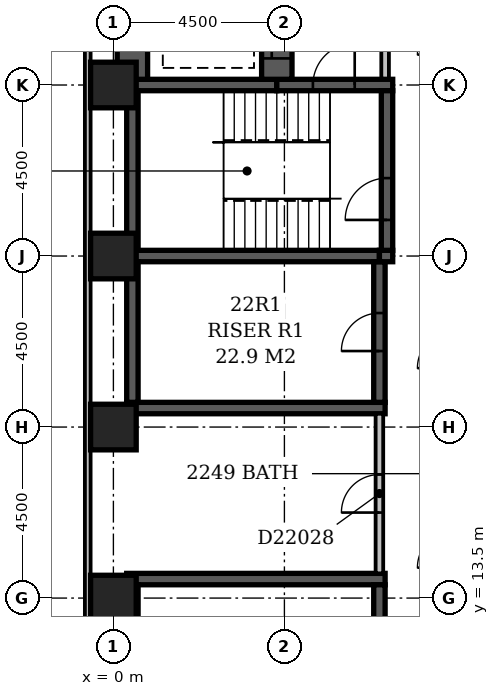
"""IFC4 building model, lengths in metres.
Left out: names, types, materials, properties, quantities, classifications, styles, units other than length and angle.
Written with IfcOpenShell. Run it as: python <this file> out.ifc"""

import sys

from ifc_helpers import new_model, si_unit, direction, frame, frame_2d, origin, origin_2d, place, context, subcontext, project, spatial, rectangle, extrude, element, fill, save


model = new_model("IFC4")
c1 = context("Model", 3, precision=1e-05, world=origin(), true_north=direction((0.0, 1.0)))
c2 = subcontext(c1, "Body", "Model", "MODEL_VIEW")
j1 = project(units=[si_unit("LENGTHUNIT", "METRE"), si_unit("PLANEANGLEUNIT", "RADIAN")], contexts=[c1])
p1 = place(None, origin())
s1 = spatial("IfcSite", under=j1, at=p1, CompositionType="ELEMENT")
p2 = place(p1, origin())
s2 = spatial("IfcBuilding", under=s1, at=p2, CompositionType="ELEMENT")
p3 = place(p2, frame((0.0, 0.0, 90.2)))
s3 = spatial("IfcBuildingStorey", under=s2, at=p3, CompositionType="ELEMENT", Elevation=90.2)
for number, where, z_axis, x_axis in (
    (1, (0.35, 14.0, -0.3), (0.0, 0.0, 1.0), (1.0, 0.0, 0.0)),
    (2, (0.35, 18.5, -0.3), (0.0, 0.0, 1.0), (1.0, 0.0, 0.0)),
):
    element("IfcWall", number, at=place(p3, frame(where, z_axis=z_axis, x_axis=x_axis)), inside=s3, PredefinedType="SHEAR", context=c2, shape_type="SweptSolid", body=[
        extrude(rectangle(XDim=6.8, YDim=0.3, at=frame_2d((3.4, 0.0))), origin(), (0.0, 0.0, 1.0), 3.6),
    ])
p4 = place(p3, frame((0.35, 22.5, -0.3), z_axis=(0.0, 0.0, 1.0), x_axis=(1.0, 0.0, 0.0)))
e3 = element("IfcWall", 3, at=p4, inside=s3, PredefinedType="SHEAR", context=c2, shape_type="SweptSolid", body=[
    extrude(rectangle(XDim=6.65, YDim=0.3, at=frame_2d((3.325, 0.0))), origin(), (0.0, 0.0, 1.0), 3.6),
])
p5 = place(p3, frame((0.35, 27.0, -0.3), z_axis=(0.0, 0.0, 1.0), x_axis=(1.0, 0.0, 0.0)))
e4 = element("IfcWall", 4, at=p5, inside=s3, PredefinedType="SHEAR", context=c2, shape_type="SweptSolid", body=[
    extrude(rectangle(XDim=3.95, YDim=0.3, at=frame_2d((1.975, 0.0))), origin(), (0.0, 0.0, 1.0), 3.6),
])
for number, where, z_axis, x_axis in (
    (5, (0.5, 10.15, -0.3), (0.0, 0.0, 1.0), (0.0, 1.0, 0.0)),
    (6, (0.5, 18.65, -0.3), (0.0, 0.0, 1.0), (0.0, 1.0, 0.0)),
):
    element("IfcWall", number, at=place(p3, frame(where, z_axis=z_axis, x_axis=x_axis)), inside=s3, PredefinedType="SHEAR", context=c2, shape_type="SweptSolid", body=[
        extrude(rectangle(XDim=3.7, YDim=0.3, at=frame_2d((1.85, 0.0))), origin(), (0.0, 0.0, 1.0), 3.6),
    ])
p6 = place(p3, frame((0.5, 22.65, -0.3), z_axis=(0.0, 0.0, 1.0), x_axis=(0.0, 1.0, 0.0)))
e7 = element("IfcWall", 7, at=p6, inside=s3, PredefinedType="SHEAR", context=c2, shape_type="SweptSolid", body=[
    extrude(rectangle(XDim=4.2, YDim=0.3, at=frame_2d((2.1, 0.0))), origin(), (0.0, 0.0, 1.0), 3.6),
])
p7 = place(p3, frame((0.5, 27.15, -0.3), z_axis=(0.0, 0.0, 1.0), x_axis=(0.0, 1.0, 0.0)))
e8 = element("IfcWall", 8, at=p7, inside=s3, PredefinedType="SHEAR", context=c2, shape_type="SweptSolid", body=[
    extrude(rectangle(XDim=6.95, YDim=0.8, at=frame_2d((3.475, 0.0))), origin(), (0.0, 0.0, 1.0), 3.6),
])
p8 = place(p3, frame((4.3, 27.0, -0.3), z_axis=(0.0, 0.0, 1.0), x_axis=(1.0, 0.0, 0.0)))
e9 = element("IfcWall", 9, at=p8, inside=s3, PredefinedType="SHEAR", context=c2, shape_type="SweptSolid", body=[
    extrude(rectangle(XDim=3.05, YDim=0.3, at=frame_2d((1.525, 0.0))), origin(), (0.0, 0.0, 1.0), 3.6),
])
p9 = place(p8, frame((0.95, 0.0, 0.3)))
e10 = element("IfcOpeningElement", 10, at=p9, cuts=e9, PredefinedType="OPENING", context=c2, shape_type="SweptSolid", body=[
    extrude(rectangle(XDim=1.1, YDim=2.1, at=frame_2d((0.55, 1.05))), frame((0.0, 0.162, 0.0), z_axis=(0.0, -1.0, 0.0), x_axis=(1.0, 0.0, 0.0)), (0.0, 0.0, 1.0), 0.324),
])
p10 = place(p3, frame((4.3, 27.15, -0.3), z_axis=(0.0, 0.0, 1.0), x_axis=(0.0, 1.0, 0.0)))
e11 = element("IfcWall", 11, at=p10, inside=s3, PredefinedType="SHEAR", context=c2, shape_type="SweptSolid", body=[
    extrude(rectangle(XDim=6.95, YDim=0.8, at=frame_2d((3.475, 0.0))), origin(), (0.0, 0.0, 1.0), 3.6),
])
p11 = place(p10, frame((3.05, 0.0, 0.3)))
e12 = element("IfcOpeningElement", 12, at=p11, cuts=e11, PredefinedType="OPENING", context=c2, shape_type="SweptSolid", body=[
    extrude(rectangle(XDim=1.1, YDim=2.1, at=frame_2d((0.55, 1.05))), frame((0.0, 0.412, 0.0), z_axis=(0.0, -1.0, 0.0), x_axis=(1.0, 0.0, 0.0)), (0.0, 0.0, 1.0), 0.824),
])
p12 = place(p10, frame((0.55, 0.0, 0.3)))
e13 = element("IfcOpeningElement", 13, at=p12, cuts=e11, PredefinedType="OPENING", context=c2, shape_type="SweptSolid", body=[
    extrude(rectangle(XDim=1.1, YDim=2.1, at=frame_2d((0.55, 1.05))), frame((0.0, 0.412, 0.0), z_axis=(0.0, -1.0, 0.0), x_axis=(1.0, 0.0, 0.0)), (0.0, 0.0, 1.0), 0.824),
])
p13 = place(p10, frame((5.35, 0.0, 0.3)))
e14 = element("IfcOpeningElement", 14, at=p13, cuts=e11, PredefinedType="OPENING", context=c2, shape_type="SweptSolid", body=[
    extrude(rectangle(XDim=1.1, YDim=2.1, at=frame_2d((0.55, 1.05))), frame((0.0, 0.412, 0.0), z_axis=(0.0, -1.0, 0.0), x_axis=(1.0, 0.0, 0.0)), (0.0, 0.0, 1.0), 0.824),
])
p14 = place(p3, frame((7.0, 10.15, -0.3), z_axis=(0.0, 0.0, 1.0), x_axis=(0.0, 1.0, 0.0)))
e15 = element("IfcWall", 15, at=p14, inside=s3, PredefinedType="SHEAR", context=c2, shape_type="SweptSolid", body=[
    extrude(rectangle(XDim=3.7, YDim=0.3, at=frame_2d((1.85, 0.0))), origin(), (0.0, 0.0, 1.0), 3.6),
])
p15 = place(p14, frame((1.35, 0.0, 0.3)))
e16 = element("IfcOpeningElement", 16, at=p15, cuts=e15, PredefinedType="OPENING", context=c2, shape_type="SweptSolid", body=[
    extrude(rectangle(XDim=1.0, YDim=2.1, at=frame_2d((0.5, 1.05))), frame((0.0, 0.162, 0.0), z_axis=(0.0, -1.0, 0.0), x_axis=(1.0, 0.0, 0.0)), (0.0, 0.0, 1.0), 0.324),
])
p16 = place(p3, frame((7.0, 18.65, -0.3), z_axis=(0.0, 0.0, 1.0), x_axis=(0.0, 1.0, 0.0)))
e17 = element("IfcWall", 17, at=p16, inside=s3, PredefinedType="SHEAR", context=c2, shape_type="SweptSolid", body=[
    extrude(rectangle(XDim=3.7, YDim=0.3, at=frame_2d((1.85, 0.0))), origin(), (0.0, 0.0, 1.0), 3.6),
])
p17 = place(p16, frame((1.35, 0.0, 0.3)))
e18 = element("IfcOpeningElement", 18, at=p17, cuts=e17, PredefinedType="OPENING", context=c2, shape_type="SweptSolid", body=[
    extrude(rectangle(XDim=1.0, YDim=2.1, at=frame_2d((0.5, 1.05))), frame((0.0, 0.162, 0.0), z_axis=(0.0, -1.0, 0.0), x_axis=(1.0, 0.0, 0.0)), (0.0, 0.0, 1.0), 0.324),
])
p18 = place(p3, frame((7.0, 22.5, -0.3), z_axis=(0.0, 0.0, 1.0), x_axis=(1.0, 0.0, 0.0)))
e19 = element("IfcWall", 19, at=p18, inside=s3, PredefinedType="SHEAR", context=c2, shape_type="SweptSolid", body=[
    extrude(rectangle(XDim=0.35, YDim=0.3, at=frame_2d((0.175, 0.0))), origin(), (0.0, 0.0, 1.0), 3.6),
])
p19 = place(p3, frame((7.2, 22.65, -0.3), z_axis=(0.0, 0.0, 1.0), x_axis=(0.0, 1.0, 0.0)))
e20 = element("IfcWall", 20, at=p19, inside=s3, PredefinedType="SHEAR", context=c2, shape_type="SweptSolid", body=[
    extrude(rectangle(XDim=4.2, YDim=0.3, at=frame_2d((2.1, 0.0))), origin(), (0.0, 0.0, 1.0), 3.6),
])
p20 = place(p19, frame((0.8, 0.0, 0.3)))
e21 = element("IfcOpeningElement", 21, at=p20, cuts=e20, PredefinedType="OPENING", context=c2, shape_type="SweptSolid", body=[
    extrude(rectangle(XDim=1.1, YDim=2.1, at=frame_2d((0.55, 1.05))), frame((0.0, 0.162, 0.0), z_axis=(0.0, -1.0, 0.0), x_axis=(1.0, 0.0, 0.0)), (0.0, 0.0, 1.0), 0.324),
])
for number, where, z_axis, x_axis in (
    (22, (0.0, 13.5, -0.3), (0.0, 0.0, 1.0), (1.0, 0.0, 0.0)),
    (23, (0.0, 18.0, -0.3), (0.0, 0.0, 1.0), (1.0, 0.0, 0.0)),
    (24, (0.0, 22.5, -0.3), (0.0, 0.0, 1.0), (1.0, 0.0, 0.0)),
    (25, (0.0, 27.0, -0.3), (0.0, 0.0, 1.0), (1.0, 0.0, 0.0)),
):
    element("IfcColumn", number, at=place(p3, frame(where, z_axis=z_axis, x_axis=x_axis)), inside=s3, PredefinedType="COLUMN", context=c2, shape_type="SweptSolid", body=[
        extrude(rectangle(XDim=1.2, YDim=1.2, at=origin_2d()), origin(), (0.0, 0.0, 1.0), 3.6),
    ])
p21 = place(p3, frame((-0.675, 59.1, 0.0), z_axis=(0.0, 0.0, 1.0), x_axis=(0.0, -1.0, 0.0)))
e26 = element("IfcWall", 26, at=p21, inside=s3, PredefinedType="STANDARD", context=c2, shape_type="SweptSolid", body=[
    extrude(rectangle(XDim=55.35, YDim=0.15, at=frame_2d((27.675, 0.0))), origin(), (0.0, 0.0, 1.0), 2.7),
])
p22 = place(p21, frame((10.65, 0.0, 0.6)))
e27 = element("IfcOpeningElement", 27, at=p22, cuts=e26, PredefinedType="OPENING", context=c2, shape_type="SweptSolid", body=[
    extrude(rectangle(XDim=2.4, YDim=1.8, at=frame_2d((1.2, 0.9))), frame((0.0, 0.087, 0.0), z_axis=(0.0, -1.0, 0.0), x_axis=(1.0, 0.0, 0.0)), (0.0, 0.0, 1.0), 0.174),
])
p23 = place(p21, frame((15.15, 0.0, 0.6)))
e28 = element("IfcOpeningElement", 28, at=p23, cuts=e26, PredefinedType="OPENING", context=c2, shape_type="SweptSolid", body=[
    extrude(rectangle(XDim=2.4, YDim=1.8, at=frame_2d((1.2, 0.9))), frame((0.0, 0.087, 0.0), z_axis=(0.0, -1.0, 0.0), x_axis=(1.0, 0.0, 0.0)), (0.0, 0.0, 1.0), 0.174),
])
p24 = place(p21, frame((19.65, 0.0, 0.6)))
e29 = element("IfcOpeningElement", 29, at=p24, cuts=e26, PredefinedType="OPENING", context=c2, shape_type="SweptSolid", body=[
    extrude(rectangle(XDim=2.4, YDim=1.8, at=frame_2d((1.2, 0.9))), frame((0.0, 0.087, 0.0), z_axis=(0.0, -1.0, 0.0), x_axis=(1.0, 0.0, 0.0)), (0.0, 0.0, 1.0), 0.174),
])
p25 = place(p3, frame((7.15, 27.17, 0.0), z_axis=(0.0, 0.0, 1.0), x_axis=(0.0, 1.0, 0.0)))
e30 = element("IfcWall", 30, at=p25, inside=s3, PredefinedType="PARTITIONING", context=c2, shape_type="SweptSolid", body=[
    extrude(rectangle(XDim=4.83, YDim=0.2, at=frame_2d((2.415, 0.0))), origin(), (0.0, 0.0, 1.0), 3.3),
])
p26 = place(p25, frame((1.73, 0.0, 0.0)))
e31 = element("IfcOpeningElement", 31, at=p26, cuts=e30, PredefinedType="OPENING", context=c2, shape_type="SweptSolid", body=[
    extrude(rectangle(XDim=1.2, YDim=2.1, at=frame_2d((0.6, 1.05))), frame((0.0, 0.112, 0.0), z_axis=(0.0, -1.0, 0.0), x_axis=(1.0, 0.0, 0.0)), (0.0, 0.0, 1.0), 0.224),
])
p27 = place(p3, frame((7.0, 14.15, 0.0), z_axis=(0.0, 0.0, 1.0), x_axis=(0.0, 1.0, 0.0)))
e32 = element("IfcWall", 32, at=p27, inside=s3, PredefinedType="PARTITIONING", context=c2, shape_type="SweptSolid", body=[
    extrude(rectangle(XDim=4.2, YDim=0.2, at=frame_2d((2.1, 0.0))), origin(), (0.0, 0.0, 1.0), 3.3),
])
p28 = place(p27, frame((1.6, 0.0, 0.0)))
e33 = element("IfcOpeningElement", 33, at=p28, cuts=e32, PredefinedType="OPENING", context=c2, shape_type="SweptSolid", body=[
    extrude(rectangle(XDim=1.0, YDim=2.1, at=frame_2d((0.5, 1.05))), frame((0.0, 0.112, 0.0), z_axis=(0.0, -1.0, 0.0), x_axis=(1.0, 0.0, 0.0)), (0.0, 0.0, 1.0), 0.224),
])
p29 = place(p12, origin())
e34 = element("IfcDoor", 34, at=p29, inside=s3, OperationType="SLIDING_TO_LEFT", PredefinedType="DOOR", context=c2, shape_type="SweptSolid", body=[
    extrude(rectangle(XDim=1.1, YDim=2.1, at=frame_2d((0.55, 1.05))), frame((0.0, 0.025, 0.0), z_axis=(0.0, -1.0, 0.0), x_axis=(1.0, 0.0, 0.0)), (0.0, 0.0, 1.0), 0.05),
])
fill(e13, e34)
p30 = place(p17, origin())
e35 = element("IfcDoor", 35, at=p30, inside=s3, OperationType="SINGLE_SWING_LEFT", PredefinedType="DOOR", context=c2, shape_type="SweptSolid", body=[
    extrude(rectangle(XDim=1.0, YDim=2.1, at=frame_2d((0.5, 1.05))), frame((0.0, 0.025, 0.0), z_axis=(0.0, -1.0, 0.0), x_axis=(1.0, 0.0, 0.0)), (0.0, 0.0, 1.0), 0.05),
])
fill(e18, e35)
p31 = place(p9, frame((1.1, 0.0, 0.0), z_axis=(0.0, 0.0, 1.0), x_axis=(-1.0, 0.0, 0.0)))
e36 = element("IfcDoor", 36, at=p31, inside=s3, OperationType="SINGLE_SWING_LEFT", PredefinedType="DOOR", context=c2, shape_type="SweptSolid", body=[
    extrude(rectangle(XDim=1.1, YDim=2.1, at=frame_2d((0.55, 1.05))), frame((0.0, 0.025, 0.0), z_axis=(0.0, -1.0, 0.0), x_axis=(1.0, 0.0, 0.0)), (0.0, 0.0, 1.0), 0.05),
])
fill(e10, e36)
p32 = place(p20, origin())
e37 = element("IfcDoor", 37, at=p32, inside=s3, OperationType="SINGLE_SWING_LEFT", PredefinedType="DOOR", context=c2, shape_type="SweptSolid", body=[
    extrude(rectangle(XDim=1.1, YDim=2.1, at=frame_2d((0.55, 1.05))), frame((0.0, 0.025, 0.0), z_axis=(0.0, -1.0, 0.0), x_axis=(1.0, 0.0, 0.0)), (0.0, 0.0, 1.0), 0.05),
])
fill(e21, e37)
p33 = place(p28, origin())
e38 = element("IfcDoor", 38, at=p33, inside=s3, OperationType="SINGLE_SWING_LEFT", PredefinedType="DOOR", context=c2, shape_type="SweptSolid", body=[
    extrude(rectangle(XDim=1.0, YDim=2.1, at=frame_2d((0.5, 1.05))), frame((0.0, 0.025, 0.0), z_axis=(0.0, -1.0, 0.0), x_axis=(1.0, 0.0, 0.0)), (0.0, 0.0, 1.0), 0.05),
])
fill(e33, e38)
save(model, sys.argv[1])
